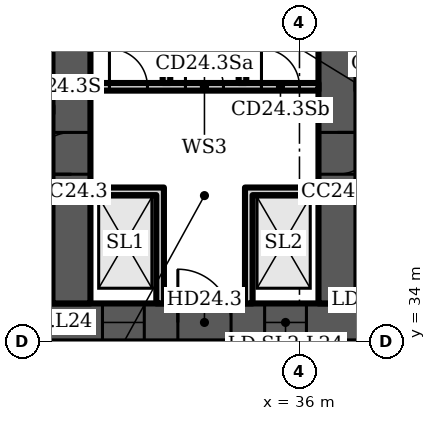
"""IFC4 building model, lengths in metres.
Left out: names, types, materials, properties, quantities, classifications, styles, units other than length and angle.
Written with IfcOpenShell. Run it as: python <this file> out.ifc"""

import sys

from ifc_helpers import new_model, si_unit, direction, frame, frame_2d, origin, place, context, subcontext, project, spatial, polyline, rectangle, outline, extrude, element, fill, save


model = new_model("IFC4")
c1 = context("Model", 3, precision=1e-05, world=origin(), true_north=direction((0.0, 1.0)))
c2 = subcontext(c1, "Body", "Model", "MODEL_VIEW")
j1 = project(units=[si_unit("LENGTHUNIT", "METRE"), si_unit("PLANEANGLEUNIT", "RADIAN")], contexts=[c1])
p1 = place(None, origin())
s1 = spatial("IfcSite", under=j1, at=p1, CompositionType="ELEMENT")
p2 = place(p1, origin())
s2 = spatial("IfcBuilding", under=s1, at=p2, CompositionType="ELEMENT")
p3 = place(p2, frame((0.0, 0.0, 107.5)))
s3 = spatial("IfcBuildingStorey", under=s2, at=p3, CompositionType="ELEMENT", Elevation=107.5)
p4 = place(p3, frame((16.0, 34.5, 0.0), z_axis=(0.0, 0.0, 1.0), x_axis=(1.0, 0.0, 0.0)))
e1 = element("IfcWall", 1, at=p4, inside=s3, PredefinedType="SHEAR", context=c2, shape_type="SweptSolid", body=[
    extrude(rectangle(XDim=49.0, YDim=1.0, at=frame_2d((24.5, 0.0))), origin(), (0.0, 0.0, 1.0), 3.6),
])
p5 = place(p4, frame((1.2, 0.0, 0.0)))
e2 = element("IfcOpeningElement", 2, at=p5, cuts=e1, PredefinedType="OPENING", context=c2, shape_type="SweptSolid", body=[
    extrude(rectangle(XDim=1.1, YDim=2.1, at=frame_2d((0.55, 1.05))), frame((0.0, 0.51, 0.0), z_axis=(0.0, -1.0, 0.0), x_axis=(1.0, 0.0, 0.0)), (0.0, 0.0, 1.0), 1.02),
])
p6 = place(p4, frame((5.083, 0.0, 0.0)))
e3 = element("IfcOpeningElement", 3, at=p6, cuts=e1, PredefinedType="OPENING", context=c2, shape_type="SweptSolid", body=[
    extrude(rectangle(XDim=1.1, YDim=2.1, at=frame_2d((0.55, 1.05))), frame((0.0, 0.51, 0.0), z_axis=(0.0, -1.0, 0.0), x_axis=(1.0, 0.0, 0.0)), (0.0, 0.0, 1.0), 1.02),
])
p7 = place(p4, frame((2.933, 0.0, 0.0)))
e4 = element("IfcOpeningElement", 4, at=p7, cuts=e1, PredefinedType="OPENING", context=c2, shape_type="SweptSolid", body=[
    extrude(rectangle(XDim=1.4, YDim=2.1, at=frame_2d((0.7, 1.05))), frame((0.0, 0.51, 0.0), z_axis=(0.0, -1.0, 0.0), x_axis=(1.0, 0.0, 0.0)), (0.0, 0.0, 1.0), 1.02),
])
p8 = place(p4, frame((7.65, 0.0, 0.0)))
e5 = element("IfcOpeningElement", 5, at=p8, cuts=e1, PredefinedType="OPENING", context=c2, shape_type="SweptSolid", body=[
    extrude(rectangle(XDim=1.2, YDim=2.1, at=frame_2d((0.6, 1.05))), frame((0.0, 0.51, 0.0), z_axis=(0.0, -1.0, 0.0), x_axis=(1.0, 0.0, 0.0)), (0.0, 0.0, 1.0), 1.02),
])
p9 = place(p4, frame((14.817, 0.0, 0.0)))
e6 = element("IfcOpeningElement", 6, at=p9, cuts=e1, PredefinedType="OPENING", context=c2, shape_type="SweptSolid", body=[
    extrude(rectangle(XDim=1.1, YDim=2.1, at=frame_2d((0.55, 1.05))), frame((0.0, 0.51, 0.0), z_axis=(0.0, -1.0, 0.0), x_axis=(1.0, 0.0, 0.0)), (0.0, 0.0, 1.0), 1.02),
])
p10 = place(p4, frame((19.083, 0.0, 0.0)))
e7 = element("IfcOpeningElement", 7, at=p10, cuts=e1, PredefinedType="OPENING", context=c2, shape_type="SweptSolid", body=[
    extrude(rectangle(XDim=1.1, YDim=2.1, at=frame_2d((0.55, 1.05))), frame((0.0, 0.51, 0.0), z_axis=(0.0, -1.0, 0.0), x_axis=(1.0, 0.0, 0.0)), (0.0, 0.0, 1.0), 1.02),
])
p11 = place(p4, frame((16.8, 0.0, 0.0)))
e8 = element("IfcOpeningElement", 8, at=p11, cuts=e1, PredefinedType="OPENING", context=c2, shape_type="SweptSolid", body=[
    extrude(rectangle(XDim=1.4, YDim=2.1, at=frame_2d((0.7, 1.05))), frame((0.0, 0.51, 0.0), z_axis=(0.0, -1.0, 0.0), x_axis=(1.0, 0.0, 0.0)), (0.0, 0.0, 1.0), 1.02),
])
p12 = place(p4, frame((21.817, 0.0, 0.0)))
e9 = element("IfcOpeningElement", 9, at=p12, cuts=e1, PredefinedType="OPENING", context=c2, shape_type="SweptSolid", body=[
    extrude(rectangle(XDim=1.1, YDim=2.1, at=frame_2d((0.55, 1.05))), frame((0.0, 0.51, 0.0), z_axis=(0.0, -1.0, 0.0), x_axis=(1.0, 0.0, 0.0)), (0.0, 0.0, 1.0), 1.02),
])
p13 = place(p4, frame((26.083, 0.0, 0.0)))
e10 = element("IfcOpeningElement", 10, at=p13, cuts=e1, PredefinedType="OPENING", context=c2, shape_type="SweptSolid", body=[
    extrude(rectangle(XDim=1.1, YDim=2.1, at=frame_2d((0.55, 1.05))), frame((0.0, 0.51, 0.0), z_axis=(0.0, -1.0, 0.0), x_axis=(1.0, 0.0, 0.0)), (0.0, 0.0, 1.0), 1.02),
])
p14 = place(p4, frame((33.15, 0.0, 0.0)))
e11 = element("IfcOpeningElement", 11, at=p14, cuts=e1, PredefinedType="OPENING", context=c2, shape_type="SweptSolid", body=[
    extrude(rectangle(XDim=1.2, YDim=2.1, at=frame_2d((0.6, 1.05))), frame((0.0, 0.51, 0.0), z_axis=(0.0, -1.0, 0.0), x_axis=(1.0, 0.0, 0.0)), (0.0, 0.0, 1.0), 1.02),
])
p15 = place(p4, frame((37.8, 0.0, 0.0)))
e12 = element("IfcOpeningElement", 12, at=p15, cuts=e1, PredefinedType="OPENING", context=c2, shape_type="SweptSolid", body=[
    extrude(rectangle(XDim=1.4, YDim=2.1, at=frame_2d((0.7, 1.05))), frame((0.0, 0.51, 0.0), z_axis=(0.0, -1.0, 0.0), x_axis=(1.0, 0.0, 0.0)), (0.0, 0.0, 1.0), 1.02),
])
p16 = place(p4, frame((42.817, 0.0, 0.0)))
e13 = element("IfcOpeningElement", 13, at=p16, cuts=e1, PredefinedType="OPENING", context=c2, shape_type="SweptSolid", body=[
    extrude(rectangle(XDim=1.1, YDim=2.1, at=frame_2d((0.55, 1.05))), frame((0.0, 0.51, 0.0), z_axis=(0.0, -1.0, 0.0), x_axis=(1.0, 0.0, 0.0)), (0.0, 0.0, 1.0), 1.02),
])
p17 = place(p4, frame((46.7, 0.0, 0.0)))
e14 = element("IfcOpeningElement", 14, at=p17, cuts=e1, PredefinedType="OPENING", context=c2, shape_type="SweptSolid", body=[
    extrude(rectangle(XDim=1.1, YDim=2.1, at=frame_2d((0.55, 1.05))), frame((0.0, 0.51, 0.0), z_axis=(0.0, -1.0, 0.0), x_axis=(1.0, 0.0, 0.0)), (0.0, 0.0, 1.0), 1.02),
])
p18 = place(p4, frame((44.667, 0.0, 0.0)))
e15 = element("IfcOpeningElement", 15, at=p18, cuts=e1, PredefinedType="OPENING", context=c2, shape_type="SweptSolid", body=[
    extrude(rectangle(XDim=1.4, YDim=2.1, at=frame_2d((0.7, 1.05))), frame((0.0, 0.51, 0.0), z_axis=(0.0, -1.0, 0.0), x_axis=(1.0, 0.0, 0.0)), (0.0, 0.0, 1.0), 1.02),
])
p19 = place(p3, frame((30.0, 35.0, 0.0), z_axis=(0.0, 0.0, 1.0), x_axis=(0.0, 1.0, 0.0)))
e16 = element("IfcWall", 16, at=p19, inside=s3, PredefinedType="SHEAR", context=c2, shape_type="SweptSolid", body=[
    extrude(rectangle(XDim=13.965, YDim=1.0, at=frame_2d((6.982, 0.0))), origin(), (0.0, 0.0, 1.0), 3.6),
])
p20 = place(p19, frame((3.4, 0.0, 0.0)))
e17 = element("IfcOpeningElement", 17, at=p20, cuts=e16, PredefinedType="OPENING", context=c2, shape_type="SweptSolid", body=[
    extrude(rectangle(XDim=1.1, YDim=2.1, at=frame_2d((0.55, 1.05))), frame((0.0, 0.51, 0.0), z_axis=(0.0, -1.0, 0.0), x_axis=(1.0, 0.0, 0.0)), (0.0, 0.0, 1.0), 1.02),
])
p21 = place(p3, frame((37.0, 35.0, 0.0), z_axis=(0.0, 0.0, 1.0), x_axis=(0.0, 1.0, 0.0)))
e18 = element("IfcWall", 18, at=p21, inside=s3, PredefinedType="SHEAR", context=c2, shape_type="SweptSolid", body=[
    extrude(rectangle(XDim=14.577, YDim=1.0, at=frame_2d((7.289, 0.0))), origin(), (0.0, 0.0, 1.0), 3.6),
])
p22 = place(p21, frame((3.4, 0.0, 0.0)))
e19 = element("IfcOpeningElement", 19, at=p22, cuts=e18, PredefinedType="OPENING", context=c2, shape_type="SweptSolid", body=[
    extrude(rectangle(XDim=1.1, YDim=2.1, at=frame_2d((0.55, 1.05))), frame((0.0, 0.51, 0.0), z_axis=(0.0, -1.0, 0.0), x_axis=(1.0, 0.0, 0.0)), (0.0, 0.0, 1.0), 1.02),
])
p23 = place(p21, frame((9.8, 0.0, 0.0)))
e20 = element("IfcOpeningElement", 20, at=p23, cuts=e18, PredefinedType="OPENING", context=c2, shape_type="SweptSolid", body=[
    extrude(rectangle(XDim=1.0, YDim=2.1, at=frame_2d((0.5, 1.05))), frame((0.0, 0.51, 0.0), z_axis=(0.0, -1.0, 0.0), x_axis=(1.0, 0.0, 0.0)), (0.0, 0.0, 1.0), 1.02),
])
p24 = place(p3, frame((30.5, 40.7, 0.0), z_axis=(0.0, 0.0, 1.0), x_axis=(1.0, 0.0, 0.0)))
e21 = element("IfcWall", 21, at=p24, inside=s3, PredefinedType="PARTITIONING", context=c2, shape_type="SweptSolid", body=[
    extrude(rectangle(XDim=6.0, YDim=0.2, at=frame_2d((3.0, 0.0))), origin(), (0.0, 0.0, 1.0), 3.2),
])
p25 = place(p24, frame((0.5, 0.0, 0.0)))
e22 = element("IfcOpeningElement", 22, at=p25, cuts=e21, PredefinedType="OPENING", context=c2, shape_type="SweptSolid", body=[
    extrude(rectangle(XDim=1.0, YDim=2.1, at=frame_2d((0.5, 1.05))), frame((0.0, 0.11, 0.0), z_axis=(0.0, -1.0, 0.0), x_axis=(1.0, 0.0, 0.0)), (0.0, 0.0, 1.0), 0.22),
])
p26 = place(p24, frame((2.5, 0.0, 0.0)))
e23 = element("IfcOpeningElement", 23, at=p26, cuts=e21, PredefinedType="OPENING", context=c2, shape_type="SweptSolid", body=[
    extrude(rectangle(XDim=1.0, YDim=2.1, at=frame_2d((0.5, 1.05))), frame((0.0, 0.11, 0.0), z_axis=(0.0, -1.0, 0.0), x_axis=(1.0, 0.0, 0.0)), (0.0, 0.0, 1.0), 0.22),
])
p27 = place(p24, frame((4.5, 0.0, 0.0)))
e24 = element("IfcOpeningElement", 24, at=p27, cuts=e21, PredefinedType="OPENING", context=c2, shape_type="SweptSolid", body=[
    extrude(rectangle(XDim=1.0, YDim=2.1, at=frame_2d((0.5, 1.05))), frame((0.0, 0.11, 0.0), z_axis=(0.0, -1.0, 0.0), x_axis=(1.0, 0.0, 0.0)), (0.0, 0.0, 1.0), 0.22),
])
p28 = place(p3, frame((0.0, 0.0, -0.0)))
e25 = element("IfcWall", 25, at=p28, inside=s3, PredefinedType="PARTITIONING", context=c2, shape_type="SweptSolid", body=[
    extrude(outline(polyline([(32.233, 37.85), (30.5, 37.85), (30.5, 38.05), (32.233, 38.05), (32.433, 38.05), (32.433, 35.0), (32.233, 35.0), (32.233, 37.85)])), origin(), (0.0, 0.0, 1.0), 3.2),
])
p29 = place(p3, frame((0.0, 0.0, -0.0)))
e26 = element("IfcWall", 26, at=p29, inside=s3, PredefinedType="PARTITIONING", context=c2, shape_type="SweptSolid", body=[
    extrude(outline(polyline([(34.567, 38.05), (34.767, 38.05), (36.5, 38.05), (36.5, 37.85), (34.767, 37.85), (34.767, 35.0), (34.567, 35.0), (34.567, 38.05)])), origin(), (0.0, 0.0, 1.0), 3.2),
])
for number, where, z_axis, x_axis in (
    (27, (32.5, 40.8, 0.0), (0.0, 0.0, 1.0), (0.0, 1.0, 0.0)),
    (28, (34.5, 40.8, 0.0), (0.0, 0.0, 1.0), (0.0, 1.0, 0.0)),
):
    element("IfcWall", number, at=place(p3, frame(where, z_axis=z_axis, x_axis=x_axis)), inside=s3, PredefinedType="PARTITIONING", context=c2, shape_type="SweptSolid", body=[
        extrude(rectangle(XDim=8.232, YDim=0.2, at=frame_2d((4.116, 0.0))), origin(), (0.0, 0.0, 1.0), 3.2),
    ])
p30 = place(p9, origin())
e29 = element("IfcDoor", 29, at=p30, inside=s3, OperationType="DOUBLE_DOOR_SLIDING", PredefinedType="DOOR", context=c2, shape_type="SweptSolid", body=[
    extrude(rectangle(XDim=1.1, YDim=2.1, at=frame_2d((0.55, 1.05))), frame((0.0, 0.025, 0.0), z_axis=(0.0, -1.0, 0.0), x_axis=(1.0, 0.0, 0.0)), (0.0, 0.0, 1.0), 0.05),
])
fill(e6, e29)
p31 = place(p10, origin())
e30 = element("IfcDoor", 30, at=p31, inside=s3, OperationType="DOUBLE_DOOR_SLIDING", PredefinedType="DOOR", context=c2, shape_type="SweptSolid", body=[
    extrude(rectangle(XDim=1.1, YDim=2.1, at=frame_2d((0.55, 1.05))), frame((0.0, 0.025, 0.0), z_axis=(0.0, -1.0, 0.0), x_axis=(1.0, 0.0, 0.0)), (0.0, 0.0, 1.0), 0.05),
])
fill(e7, e30)
p32 = place(p11, origin())
e31 = element("IfcDoor", 31, at=p32, inside=s3, OperationType="DOUBLE_DOOR_SINGLE_SWING", PredefinedType="DOOR", context=c2, shape_type="SweptSolid", body=[
    extrude(rectangle(XDim=1.4, YDim=2.1, at=frame_2d((0.7, 1.05))), frame((0.0, 0.025, 0.0), z_axis=(0.0, -1.0, 0.0), x_axis=(1.0, 0.0, 0.0)), (0.0, 0.0, 1.0), 0.05),
])
fill(e8, e31)
p33 = place(p25, origin())
e32 = element("IfcDoor", 32, at=p33, inside=s3, OperationType="SINGLE_SWING_LEFT", PredefinedType="DOOR", context=c2, shape_type="SweptSolid", body=[
    extrude(rectangle(XDim=1.0, YDim=2.1, at=frame_2d((0.5, 1.05))), frame((0.0, 0.025, 0.0), z_axis=(0.0, -1.0, 0.0), x_axis=(1.0, 0.0, 0.0)), (0.0, 0.0, 1.0), 0.05),
])
fill(e22, e32)
p34 = place(p26, origin())
e33 = element("IfcDoor", 33, at=p34, inside=s3, OperationType="SINGLE_SWING_LEFT", PredefinedType="DOOR", context=c2, shape_type="SweptSolid", body=[
    extrude(rectangle(XDim=1.0, YDim=2.1, at=frame_2d((0.5, 1.05))), frame((0.0, 0.025, 0.0), z_axis=(0.0, -1.0, 0.0), x_axis=(1.0, 0.0, 0.0)), (0.0, 0.0, 1.0), 0.05),
])
fill(e23, e33)
p35 = place(p27, origin())
e34 = element("IfcDoor", 34, at=p35, inside=s3, OperationType="SINGLE_SWING_LEFT", PredefinedType="DOOR", context=c2, shape_type="SweptSolid", body=[
    extrude(rectangle(XDim=1.0, YDim=2.1, at=frame_2d((0.5, 1.05))), frame((0.0, 0.025, 0.0), z_axis=(0.0, -1.0, 0.0), x_axis=(1.0, 0.0, 0.0)), (0.0, 0.0, 1.0), 0.05),
])
fill(e24, e34)
p36 = place(p20, origin())
e35 = element("IfcDoor", 35, at=p36, inside=s3, OperationType="SINGLE_SWING_LEFT", PredefinedType="DOOR", context=c2, shape_type="SweptSolid", body=[
    extrude(rectangle(XDim=1.1, YDim=2.1, at=frame_2d((0.55, 1.05))), frame((0.0, 0.025, 0.0), z_axis=(0.0, -1.0, 0.0), x_axis=(1.0, 0.0, 0.0)), (0.0, 0.0, 1.0), 0.05),
])
fill(e17, e35)
p37 = place(p22, origin())
e36 = element("IfcDoor", 36, at=p37, inside=s3, OperationType="SINGLE_SWING_RIGHT", PredefinedType="DOOR", context=c2, shape_type="SweptSolid", body=[
    extrude(rectangle(XDim=1.1, YDim=2.1, at=frame_2d((0.55, 1.05))), frame((0.0, 0.025, 0.0), z_axis=(0.0, -1.0, 0.0), x_axis=(1.0, 0.0, 0.0)), (0.0, 0.0, 1.0), 0.05),
])
fill(e19, e36)
save(model, sys.argv[1])
